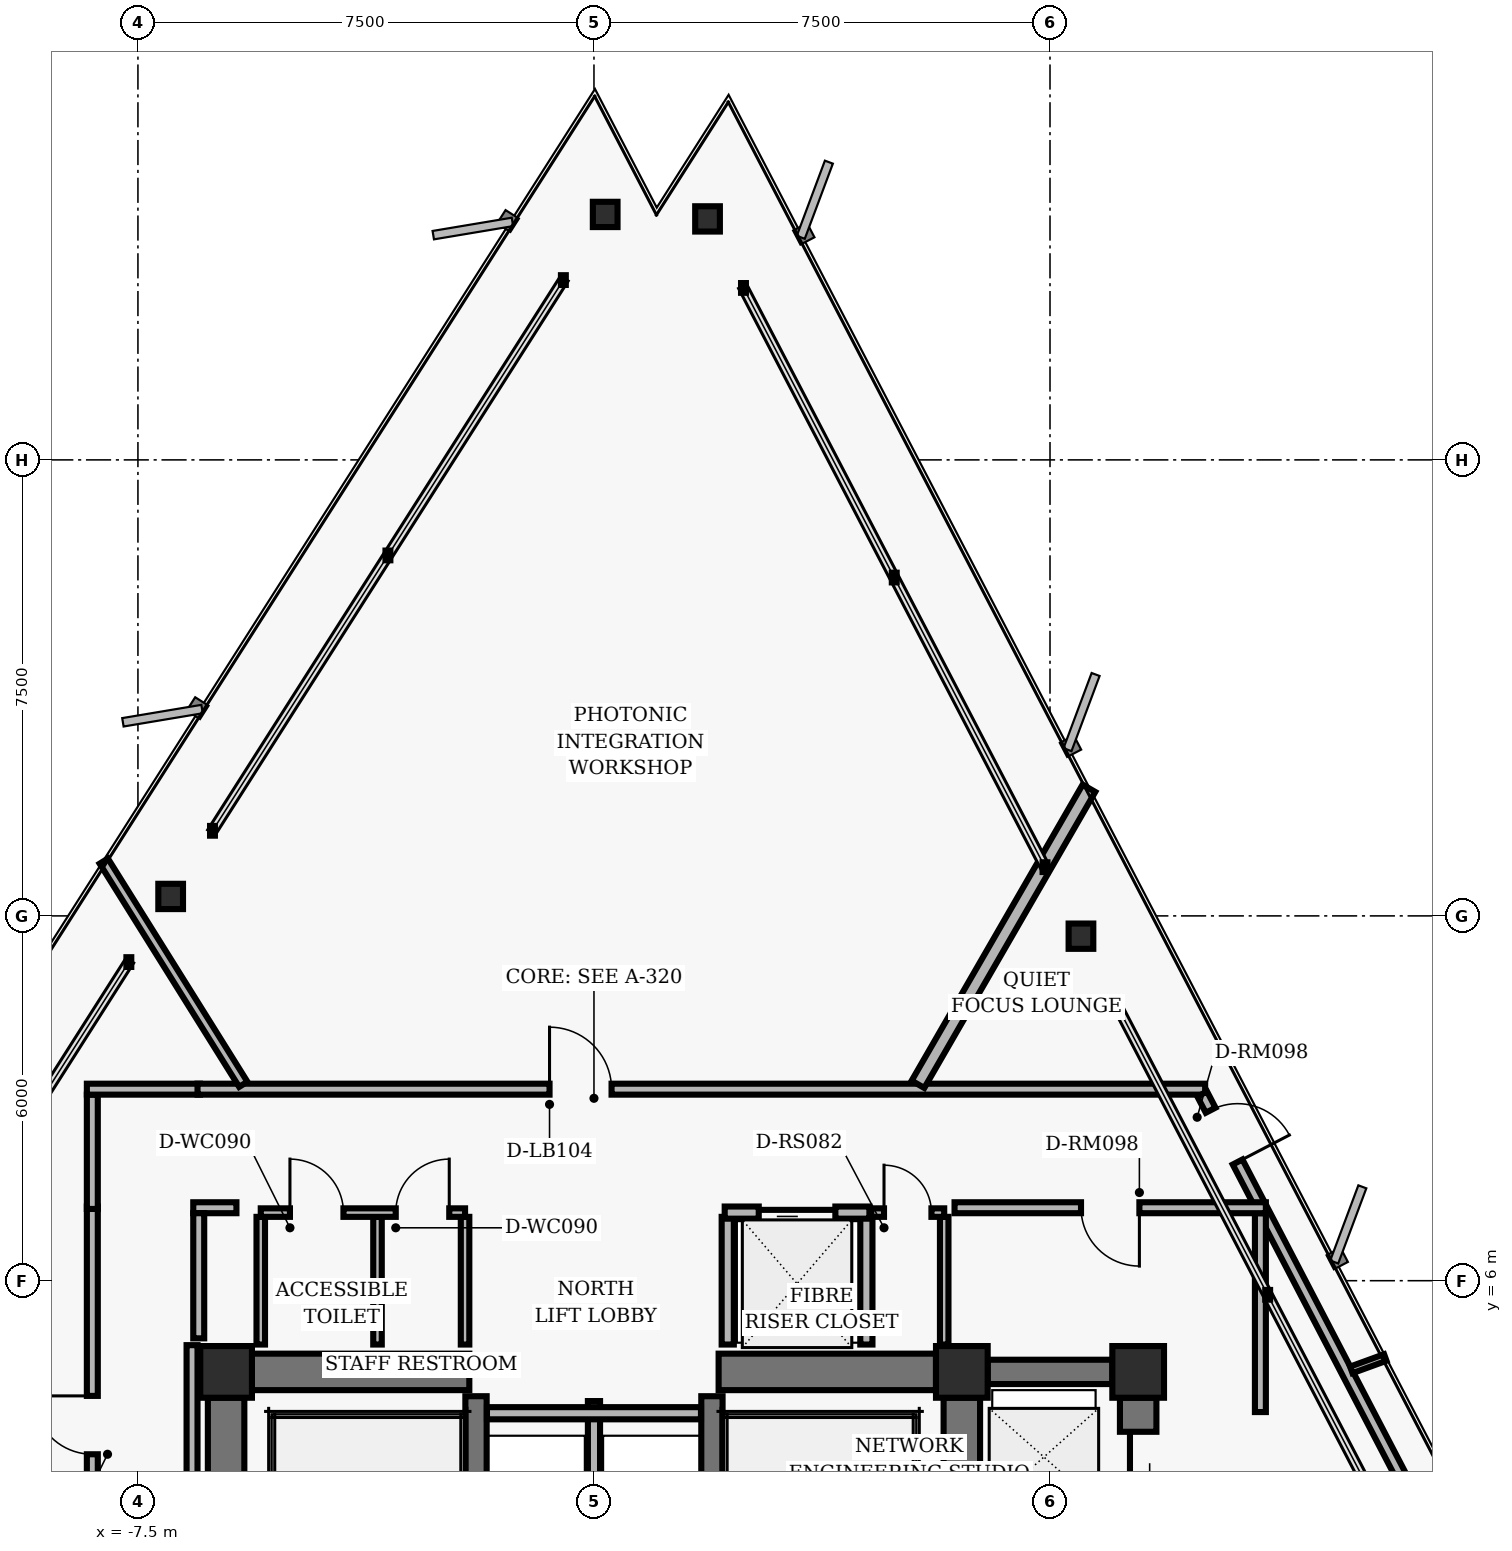
"""IFC4 building model, lengths in metres.
Left out: names, types, materials, properties, quantities, classifications, styles, units other than length and angle.
Written with IfcOpenShell. Run it as: python <this file> out.ifc"""

import sys

from ifc_helpers import new_model, si_unit, direction, frame, frame_2d, origin, origin_2d, place, context, subcontext, project, spatial, rectangle, hollow_rectangle, i_section, extrude, element, fill, save


model = new_model("IFC4")
c1 = context("Model", 3, precision=1e-05, world=origin(), true_north=direction((0.0, 1.0)))
c2 = subcontext(c1, "Body", "Model", "MODEL_VIEW")
j1 = project(units=[si_unit("LENGTHUNIT", "METRE"), si_unit("PLANEANGLEUNIT", "RADIAN")], contexts=[c1])
p1 = place(None, origin())
s1 = spatial("IfcSite", under=j1, at=p1, CompositionType="ELEMENT")
p2 = place(p1, origin())
s2 = spatial("IfcBuilding", under=s1, at=p2, CompositionType="ELEMENT")
p3 = place(p2, frame((0.0, 0.0, 135.04)))
s3 = spatial("IfcBuildingStorey", under=s2, at=p3, CompositionType="ELEMENT", Elevation=135.04)
for number, where, z_axis, x_axis in (
    (1, (-6.05, 4.5, 0.0), (0.0, 0.0, 1.0), (1.0, 0.0, 0.0)),
    (2, (6.05, 4.5, 0.0), (0.0, 0.0, 1.0), (1.0, 0.0, 0.0)),
    (3, (8.95, 4.5, 0.0), (0.0, 0.0, 1.0), (1.0, 0.0, 0.0)),
):
    element("IfcColumn", number, at=place(p3, frame(where, z_axis=z_axis, x_axis=x_axis)), inside=s3, PredefinedType="COLUMN", context=c2, shape_type="SweptSolid", body=[
        extrude(hollow_rectangle(XDim=0.85, YDim=0.85, WallThickness=0.055, InnerFilletRadius=0.02, OuterFilletRadius=0.04, at=origin_2d()), origin(), (0.0, 0.0, 1.0), 3.04),
    ])
for number, where, z_axis, x_axis in (
    (4, (-6.05, 0.425, 0.0), (0.0, 0.0, 1.0), (0.0, 1.0, 0.0)),
    (5, (6.05, 0.425, 0.0), (0.0, 0.0, 1.0), (0.0, 1.0, 0.0)),
):
    element("IfcWall", number, at=place(p3, frame(where, z_axis=z_axis, x_axis=x_axis)), inside=s3, PredefinedType="SHEAR", context=c2, shape_type="SweptSolid", body=[
        extrude(rectangle(XDim=3.65, YDim=0.6, at=frame_2d((1.825, 0.0))), origin(), (0.0, 0.0, 1.0), 2.788),
    ])
for number, where, z_axis, x_axis in (
    (6, (-1.94, -4.1, 0.0), (0.0, 0.0, 1.0), (0.0, 1.0, 0.0)),
    (7, (1.94, -4.1, 0.0), (0.0, 0.0, 1.0), (0.0, 1.0, 0.0)),
):
    element("IfcWall", number, at=place(p3, frame(where, z_axis=z_axis, x_axis=x_axis)), inside=s3, PredefinedType="SHEAR", context=c2, shape_type="SweptSolid", body=[
        extrude(rectangle(XDim=8.2, YDim=0.35, at=frame_2d((4.1, 0.0))), origin(), (0.0, 0.0, 1.0), 2.788),
    ])
for number, where, z_axis, x_axis in (
    (8, (-5.625, 4.5, 0.0), (0.0, 0.0, 1.0), (1.0, 0.0, 0.0)),
    (9, (2.05, 4.5, 0.0), (0.0, 0.0, 1.0), (1.0, 0.0, 0.0)),
):
    element("IfcWall", number, at=place(p3, frame(where, z_axis=z_axis, x_axis=x_axis)), inside=s3, PredefinedType="SHEAR", context=c2, shape_type="SweptSolid", body=[
        extrude(rectangle(XDim=3.575, YDim=0.6, at=frame_2d((1.788, 0.0))), origin(), (0.0, 0.0, 1.0), 2.788),
    ])
p4 = place(p3, frame((8.95, -3.875, 0.0), z_axis=(0.0, 0.0, 1.0), x_axis=(0.0, 1.0, 0.0)))
e10 = element("IfcWall", 10, at=p4, inside=s3, PredefinedType="SHEAR", context=c2, shape_type="SweptSolid", body=[
    extrude(rectangle(XDim=7.95, YDim=0.6, at=frame_2d((3.975, 0.0))), origin(), (0.0, 0.0, 1.0), 2.788),
])
p5 = place(p4, frame((0.55, 0.0, 0.0)))
e11 = element("IfcOpeningElement", 11, at=p5, cuts=e10, PredefinedType="OPENING", context=c2, shape_type="SweptSolid", body=[
    extrude(rectangle(XDim=1.06, YDim=2.04, at=frame_2d((0.53, 1.02))), frame((0.0, 0.31, 0.0), z_axis=(0.0, -1.0, 0.0), x_axis=(1.0, 0.0, 0.0)), (0.0, 0.0, 1.0), 0.62),
])
p6 = place(p4, frame((3.445, 0.0, 0.0)))
e12 = element("IfcOpeningElement", 12, at=p6, cuts=e10, PredefinedType="OPENING", context=c2, shape_type="SweptSolid", body=[
    extrude(rectangle(XDim=1.06, YDim=2.04, at=frame_2d((0.53, 1.02))), frame((0.0, 0.31, 0.0), z_axis=(0.0, -1.0, 0.0), x_axis=(1.0, 0.0, 0.0)), (0.0, 0.0, 1.0), 0.62),
])
p7 = place(p4, frame((6.33, 0.0, 0.0)))
e13 = element("IfcOpeningElement", 13, at=p7, cuts=e10, PredefinedType="OPENING", context=c2, shape_type="SweptSolid", body=[
    extrude(rectangle(XDim=1.06, YDim=2.04, at=frame_2d((0.53, 1.02))), frame((0.0, 0.31, 0.0), z_axis=(0.0, -1.0, 0.0), x_axis=(1.0, 0.0, 0.0)), (0.0, 0.0, 1.0), 0.62),
])
p8 = place(p3, frame((6.475, 4.5, 0.0), z_axis=(0.0, 0.0, 1.0), x_axis=(1.0, 0.0, 0.0)))
e14 = element("IfcWall", 14, at=p8, inside=s3, PredefinedType="SHEAR", context=c2, shape_type="SweptSolid", body=[
    extrude(rectangle(XDim=2.05, YDim=0.4, at=frame_2d((1.025, 0.0))), origin(), (0.0, 0.0, 1.0), 2.788),
])
for number, where, z_axis, x_axis in (
    (15, (8.009, 11.666, 0.0), (0.0, 0.0, 1.0), (1.0, 0.0, 0.0)),
    (16, (1.868, 23.463, 0.0), (0.0, 0.0, 1.0), (1.0, 0.0, 0.0)),
    (17, (0.184, 23.537, 0.0), (0.0, 0.0, 1.0), (1.0, 0.0, 0.0)),
    (18, (-6.962, 12.32, 0.0), (0.0, 0.0, 1.0), (1.0, 0.0, 0.0)),
):
    element("IfcColumn", number, at=place(p3, frame(where, z_axis=z_axis, x_axis=x_axis)), inside=s3, PredefinedType="COLUMN", context=c2, shape_type="SweptSolid", body=[
        extrude(i_section(OverallWidth=0.406, OverallDepth=0.416, WebThickness=0.03, FlangeThickness=0.048, FilletRadius=0.02, at=origin_2d()), origin(), (0.0, 0.0, 1.0), 3.04),
    ])
p9 = place(p3, frame((0.0, 1.25, 0.0), z_axis=(0.0, 0.0, 1.0), x_axis=(0.0, 1.0, 0.0)))
e19 = element("IfcWall", 19, at=p9, inside=s3, PredefinedType="PARTITIONING", context=c2, shape_type="SweptSolid", body=[
    extrude(rectangle(XDim=2.77, YDim=0.2, at=frame_2d((1.385, 0.0))), origin(), (0.0, 0.0, 1.0), 2.763),
])
p10 = place(p3, frame((-1.76, 3.82, 0.0), z_axis=(0.0, 0.0, 1.0), x_axis=(1.0, 0.0, 0.0)))
e20 = element("IfcWall", 20, at=p10, inside=s3, PredefinedType="PARTITIONING", context=c2, shape_type="SweptSolid", body=[
    extrude(rectangle(XDim=3.52, YDim=0.2, at=frame_2d((1.76, 0.0))), origin(), (0.0, 0.0, 1.0), 2.763),
])
for number, where, z_axis, x_axis in (
    (21, (2.2, 4.95, 0.0), (0.0, 0.0, 1.0), (0.0, 1.0, 0.0)),
    (22, (4.48, 4.95, 0.0), (0.0, 0.0, 1.0), (0.0, 1.0, 0.0)),
):
    element("IfcWall", number, at=place(p3, frame(where, z_axis=z_axis, x_axis=x_axis)), inside=s3, PredefinedType="PARTITIONING", context=c2, shape_type="SweptSolid", body=[
        extrude(rectangle(XDim=2.1, YDim=0.2, at=frame_2d((1.05, 0.0))), origin(), (0.0, 0.0, 1.0), 2.763),
    ])
p11 = place(p3, frame((2.15, 7.12, 0.0), z_axis=(0.0, 0.0, 1.0), x_axis=(1.0, 0.0, 0.0)))
e23 = element("IfcWall", 23, at=p11, inside=s3, PredefinedType="PARTITIONING", context=c2, shape_type="SweptSolid", body=[
    extrude(rectangle(XDim=2.38, YDim=0.2, at=frame_2d((1.19, 0.0))), origin(), (0.0, 0.0, 1.0), 2.763),
])
p12 = place(p11, frame((0.56, 0.0, 0.0)))
e24 = element("IfcOpeningElement", 24, at=p12, cuts=e23, PredefinedType="OPENING", context=c2, shape_type="SweptSolid", body=[
    extrude(rectangle(XDim=1.26, YDim=2.06, at=frame_2d((0.63, 1.03))), frame((0.0, 0.11, 0.0), z_axis=(0.0, -1.0, 0.0), x_axis=(1.0, 0.0, 0.0)), (0.0, 0.0, 1.0), 0.22),
])
for number, where, z_axis, x_axis in (
    (25, (-5.48, 4.95, 0.0), (0.0, 0.0, 1.0), (0.0, 1.0, 0.0)),
    (26, (-3.56, 4.95, 0.0), (0.0, 0.0, 1.0), (0.0, 1.0, 0.0)),
    (27, (-2.12, 4.95, 0.0), (0.0, 0.0, 1.0), (0.0, 1.0, 0.0)),
):
    element("IfcWall", number, at=place(p3, frame(where, z_axis=z_axis, x_axis=x_axis)), inside=s3, PredefinedType="PARTITIONING", context=c2, shape_type="SweptSolid", body=[
        extrude(rectangle(XDim=2.1, YDim=0.14, at=frame_2d((1.05, 0.0))), origin(), (0.0, 0.0, 1.0), 2.763),
    ])
p13 = place(p3, frame((-5.48, 7.12, 0.0), z_axis=(0.0, 0.0, 1.0), x_axis=(1.0, 0.0, 0.0)))
e28 = element("IfcWall", 28, at=p13, inside=s3, PredefinedType="PARTITIONING", context=c2, shape_type="SweptSolid", body=[
    extrude(rectangle(XDim=3.36, YDim=0.14, at=frame_2d((1.68, 0.0))), origin(), (0.0, 0.0, 1.0), 2.33),
])
p14 = place(p13, frame((0.48, 0.0, 0.0)))
e29 = element("IfcOpeningElement", 29, at=p14, cuts=e28, PredefinedType="OPENING", context=c2, shape_type="SweptSolid", body=[
    extrude(rectangle(XDim=0.88, YDim=2.02, at=frame_2d((0.44, 1.01))), frame((0.0, 0.08, 0.0), z_axis=(0.0, -1.0, 0.0), x_axis=(1.0, 0.0, 0.0)), (0.0, 0.0, 1.0), 0.16),
])
p15 = place(p13, frame((2.22, 0.0, 0.0)))
e30 = element("IfcOpeningElement", 30, at=p15, cuts=e28, PredefinedType="OPENING", context=c2, shape_type="SweptSolid", body=[
    extrude(rectangle(XDim=0.88, YDim=2.02, at=frame_2d((0.44, 1.01))), frame((0.0, 0.08, 0.0), z_axis=(0.0, -1.0, 0.0), x_axis=(1.0, 0.0, 0.0)), (0.0, 0.0, 1.0), 0.16),
])
p16 = place(p3, frame((5.76, 4.95, 0.0), z_axis=(0.0, 0.0, 1.0), x_axis=(0.0, 1.0, 0.0)))
e31 = element("IfcWall", 31, at=p16, inside=s3, PredefinedType="PARTITIONING", context=c2, shape_type="SweptSolid", body=[
    extrude(rectangle(XDim=2.1, YDim=0.14, at=frame_2d((1.05, 0.0))), origin(), (0.0, 0.0, 1.0), 2.763),
])
p17 = place(p3, frame((4.56, 7.12, 0.0), z_axis=(0.0, 0.0, 1.0), x_axis=(1.0, 0.0, 0.0)))
e32 = element("IfcWall", 32, at=p17, inside=s3, PredefinedType="PARTITIONING", context=c2, shape_type="SweptSolid", body=[
    extrude(rectangle(XDim=1.2, YDim=0.14, at=frame_2d((0.6, 0.0))), origin(), (0.0, 0.0, 1.0), 2.763),
])
p18 = place(p17, frame((0.21, 0.0, 0.0)))
e33 = element("IfcOpeningElement", 33, at=p18, cuts=e32, PredefinedType="OPENING", context=c2, shape_type="SweptSolid", body=[
    extrude(rectangle(XDim=0.78, YDim=2.01, at=frame_2d((0.39, 1.005))), frame((0.0, 0.08, 0.0), z_axis=(0.0, -1.0, 0.0), x_axis=(1.0, 0.0, 0.0)), (0.0, 0.0, 1.0), 0.16),
])
p19 = place(p3, frame((-8.25, -7.22, 0.0), z_axis=(0.0, 0.0, 1.0), x_axis=(0.0, 1.0, 0.0)))
e34 = element("IfcWall", 34, at=p19, inside=s3, PredefinedType="PARTITIONING", context=c2, shape_type="SweptSolid", body=[
    extrude(rectangle(XDim=14.44, YDim=0.18, at=frame_2d((7.22, 0.0))), origin(), (0.0, 0.0, 1.0), 2.763),
])
p20 = place(p19, frame((3.406, 0.0, 0.0)))
e35 = element("IfcOpeningElement", 35, at=p20, cuts=e34, PredefinedType="OPENING", context=c2, shape_type="SweptSolid", body=[
    extrude(rectangle(XDim=0.96, YDim=2.02, at=frame_2d((0.48, 1.01))), frame((0.0, 0.1, 0.0), z_axis=(0.0, -1.0, 0.0), x_axis=(1.0, 0.0, 0.0)), (0.0, 0.0, 1.0), 0.2),
])
p21 = place(p19, frame((10.365, 0.0, 0.0)))
e36 = element("IfcOpeningElement", 36, at=p21, cuts=e34, PredefinedType="OPENING", context=c2, shape_type="SweptSolid", body=[
    extrude(rectangle(XDim=0.96, YDim=2.02, at=frame_2d((0.48, 1.01))), frame((0.0, 0.1, 0.0), z_axis=(0.0, -1.0, 0.0), x_axis=(1.0, 0.0, 0.0)), (0.0, 0.0, 1.0), 0.2),
])
p22 = place(p3, frame((-8.25, 7.18, 0.0), z_axis=(0.0, 0.0, 1.0), x_axis=(0.0, 1.0, 0.0)))
e37 = element("IfcWall", 37, at=p22, inside=s3, PredefinedType="PARTITIONING", context=c2, shape_type="SweptSolid", body=[
    extrude(rectangle(XDim=1.88, YDim=0.18, at=frame_2d((0.94, 0.0))), origin(), (0.0, 0.0, 1.0), 2.763),
])
p23 = place(p3, frame((-8.34, 9.15, 0.0), z_axis=(0.0, 0.0, 1.0), x_axis=(1.0, 0.0, 0.0)))
e38 = element("IfcWall", 38, at=p23, inside=s3, PredefinedType="PARTITIONING", context=c2, shape_type="SweptSolid", body=[
    extrude(rectangle(XDim=1.86, YDim=0.18, at=frame_2d((0.93, 0.0))), origin(), (0.0, 0.0, 1.0), 2.763),
])
p24 = place(p3, frame((-6.52, 9.15, 0.0), z_axis=(0.0, 0.0, 1.0), x_axis=(1.0, 0.0, 0.0)))
e39 = element("IfcWall", 39, at=p24, inside=s3, PredefinedType="PARTITIONING", context=c2, shape_type="SweptSolid", body=[
    extrude(rectangle(XDim=16.572, YDim=0.18, at=frame_2d((8.286, 0.0))), origin(), (0.0, 0.0, 1.0), 2.33),
])
p25 = place(p24, frame((5.789, 0.0, 0.0)))
e40 = element("IfcOpeningElement", 40, at=p25, cuts=e39, PredefinedType="OPENING", context=c2, shape_type="SweptSolid", body=[
    extrude(rectangle(XDim=1.02, YDim=2.02, at=frame_2d((0.51, 1.01))), frame((0.0, 0.1, 0.0), z_axis=(0.0, -1.0, 0.0), x_axis=(1.0, 0.0, 0.0)), (0.0, 0.0, 1.0), 0.2),
])
p26 = place(p3, frame((10.003, 9.07, 0.0), z_axis=(0.0, 0.0, 1.0), x_axis=(0.461740291408, -0.887015165198, 0.0)))
e41 = element("IfcWall", 41, at=p26, inside=s3, PredefinedType="PARTITIONING", context=c2, shape_type="SweptSolid", body=[
    extrude(rectangle(XDim=9.976, YDim=0.18, at=frame_2d((4.988, 0.0))), origin(), (0.0, 0.0, 1.0), 2.763),
])
p27 = place(p26, frame((0.301, 0.0, 0.0)))
e42 = element("IfcOpeningElement", 42, at=p27, cuts=e41, PredefinedType="OPENING", context=c2, shape_type="SweptSolid", body=[
    extrude(rectangle(XDim=0.96, YDim=2.02, at=frame_2d((0.48, 1.01))), frame((0.0, 0.1, 0.0), z_axis=(0.0, -1.0, 0.0), x_axis=(1.0, 0.0, 0.0)), (0.0, 0.0, 1.0), 0.2),
])
p28 = place(p3, frame((10.96, 3.84, 0.0), z_axis=(0.0, 0.0, 1.0), x_axis=(0.0, 1.0, 0.0)))
e43 = element("IfcWall", 43, at=p28, inside=s3, PredefinedType="PARTITIONING", context=c2, shape_type="SweptSolid", body=[
    extrude(rectangle(XDim=3.271, YDim=0.18, at=frame_2d((1.635, 0.0))), origin(), (0.0, 0.0, 1.0), 2.763),
])
p29 = place(p3, frame((11.05, 7.2, 0.0), z_axis=(0.0, 0.0, 1.0), x_axis=(-1.0, 0.0, 0.0)))
e44 = element("IfcWall", 44, at=p29, inside=s3, PredefinedType="PARTITIONING", context=c2, shape_type="SweptSolid", body=[
    extrude(rectangle(XDim=5.12, YDim=0.18, at=frame_2d((2.56, 0.0))), origin(), (0.0, 0.0, 1.0), 2.763),
])
p30 = place(p29, frame((2.08, 0.0, 0.0)))
e45 = element("IfcOpeningElement", 45, at=p30, cuts=e44, PredefinedType="OPENING", context=c2, shape_type="SweptSolid", body=[
    extrude(rectangle(XDim=0.96, YDim=2.02, at=frame_2d((0.48, 1.01))), frame((0.0, 0.1, 0.0), z_axis=(0.0, -1.0, 0.0), x_axis=(1.0, 0.0, 0.0)), (0.0, 0.0, 1.0), 0.2),
])
p31 = place(p3, frame((-5.88, 7.2, 0.0), z_axis=(0.0, 0.0, 1.0), x_axis=(-1.0, 0.0, 0.0)))
e46 = element("IfcWall", 46, at=p31, inside=s3, PredefinedType="PARTITIONING", context=c2, shape_type="SweptSolid", body=[
    extrude(rectangle(XDim=0.71, YDim=0.18, at=frame_2d((0.355, 0.0))), origin(), (0.0, 0.0, 1.0), 2.33),
])
p32 = place(p3, frame((-6.5, 7.11, 0.0), z_axis=(0.0, 0.0, 1.0), x_axis=(0.0, -1.0, 0.0)))
e47 = element("IfcWall", 47, at=p32, inside=s3, PredefinedType="PARTITIONING", context=c2, shape_type="SweptSolid", body=[
    extrude(rectangle(XDim=2.058, YDim=0.18, at=frame_2d((1.029, 0.0))), origin(), (0.0, 0.0, 1.0), 2.132),
])
p33 = place(p3, frame((-6.61, 4.94, 0.0), z_axis=(0.0, 0.0, 1.0), x_axis=(0.0, -1.0, 0.0)))
e48 = element("IfcWall", 48, at=p33, inside=s3, PredefinedType="PARTITIONING", context=c2, shape_type="SweptSolid", body=[
    extrude(rectangle(XDim=9.46, YDim=0.18, at=frame_2d((4.73, 0.0))), origin(), (0.0, 0.0, 1.0), 2.763),
])
p34 = place(p3, frame((12.455, 4.533, 0.0), z_axis=(0.0, 0.0, 1.0), x_axis=(0.93962558955, 0.342204254011, 0.0)))
e49 = element("IfcWall", 49, at=p34, inside=s3, PredefinedType="MOVABLE", context=c2, shape_type="SweptSolid", body=[
    extrude(rectangle(XDim=0.595, YDim=0.115, at=frame_2d((0.297, 0.0))), origin(), (0.0, 0.0, 1.0), 2.763),
])
p35 = place(p3, frame((5.329, 9.23, 0.0), z_axis=(0.0, 0.0, 1.0), x_axis=(0.500024387096, 0.86601132343, 0.0)))
e50 = element("IfcWall", 50, at=p35, inside=s3, PredefinedType="PARTITIONING", context=c2, shape_type="SweptSolid", body=[
    extrude(rectangle(XDim=5.623, YDim=0.24, at=frame_2d((2.812, 0.0))), origin(), (0.0, 0.0, 1.0), 2.763),
])
p36 = place(p3, frame((-5.768, 9.23, 0.0), z_axis=(0.0, 0.0, 1.0), x_axis=(-0.529887412725, 0.848067998356, 0.0)))
e51 = element("IfcWall", 51, at=p36, inside=s3, PredefinedType="PARTITIONING", context=c2, shape_type="SweptSolid", body=[
    extrude(rectangle(XDim=4.329, YDim=0.16, at=frame_2d((2.165, 0.0))), origin(), (0.0, 0.0, 1.0), 2.763),
])
p37 = place(p12, origin())
e52 = element("IfcDoor", 52, at=p37, inside=s3, OperationType="SLIDING_TO_LEFT", PredefinedType="DOOR", context=c2, shape_type="SweptSolid", body=[
    extrude(rectangle(XDim=1.26, YDim=2.06, at=frame_2d((0.63, 1.03))), frame((0.0, 0.025, 0.0), z_axis=(0.0, -1.0, 0.0), x_axis=(1.0, 0.0, 0.0)), (0.0, 0.0, 1.0), 0.05),
])
fill(e24, e52)
p38 = place(p14, origin())
e53 = element("IfcDoor", 53, at=p38, inside=s3, OperationType="SINGLE_SWING_LEFT", PredefinedType="DOOR", context=c2, shape_type="SweptSolid", body=[
    extrude(rectangle(XDim=0.88, YDim=2.02, at=frame_2d((0.44, 1.01))), frame((0.0, 0.025, 0.0), z_axis=(0.0, -1.0, 0.0), x_axis=(1.0, 0.0, 0.0)), (0.0, 0.0, 1.0), 0.05),
])
fill(e29, e53)
p39 = place(p15, origin())
e54 = element("IfcDoor", 54, at=p39, inside=s3, OperationType="SINGLE_SWING_RIGHT", PredefinedType="DOOR", context=c2, shape_type="SweptSolid", body=[
    extrude(rectangle(XDim=0.88, YDim=2.02, at=frame_2d((0.44, 1.01))), frame((0.0, 0.025, 0.0), z_axis=(0.0, -1.0, 0.0), x_axis=(1.0, 0.0, 0.0)), (0.0, 0.0, 1.0), 0.05),
])
fill(e30, e54)
p40 = place(p18, origin())
e55 = element("IfcDoor", 55, at=p40, inside=s3, OperationType="SINGLE_SWING_LEFT", PredefinedType="DOOR", context=c2, shape_type="SweptSolid", body=[
    extrude(rectangle(XDim=0.78, YDim=2.01, at=frame_2d((0.39, 1.005))), frame((0.0, 0.025, 0.0), z_axis=(0.0, -1.0, 0.0), x_axis=(1.0, 0.0, 0.0)), (0.0, 0.0, 1.0), 0.05),
])
fill(e33, e55)
p41 = place(p7, origin())
e56 = element("IfcDoor", 56, at=p41, inside=s3, OperationType="SLIDING_TO_LEFT", PredefinedType="DOOR", context=c2, shape_type="SweptSolid", body=[
    extrude(rectangle(XDim=1.06, YDim=2.04, at=frame_2d((0.53, 1.02))), frame((0.0, 0.025, 0.0), z_axis=(0.0, -1.0, 0.0), x_axis=(1.0, 0.0, 0.0)), (0.0, 0.0, 1.0), 0.05),
])
fill(e13, e56)
p42 = place(p30, origin())
e57 = element("IfcDoor", 57, at=p42, inside=s3, OperationType="SINGLE_SWING_LEFT", PredefinedType="DOOR", context=c2, shape_type="SweptSolid", body=[
    extrude(rectangle(XDim=0.96, YDim=2.02, at=frame_2d((0.48, 1.01))), frame((0.0, 0.025, 0.0), z_axis=(0.0, -1.0, 0.0), x_axis=(1.0, 0.0, 0.0)), (0.0, 0.0, 1.0), 0.05),
])
fill(e45, e57)
p43 = place(p27, origin())
e58 = element("IfcDoor", 58, at=p43, inside=s3, OperationType="SINGLE_SWING_RIGHT", PredefinedType="DOOR", context=c2, shape_type="SweptSolid", body=[
    extrude(rectangle(XDim=0.96, YDim=2.02, at=frame_2d((0.48, 1.01))), frame((0.0, 0.025, 0.0), z_axis=(0.0, -1.0, 0.0), x_axis=(1.0, 0.0, 0.0)), (0.0, 0.0, 1.0), 0.05),
])
fill(e42, e58)
p44 = place(p25, origin())
e59 = element("IfcDoor", 59, at=p44, inside=s3, OperationType="SINGLE_SWING_LEFT", PredefinedType="DOOR", context=c2, shape_type="SweptSolid", body=[
    extrude(rectangle(XDim=1.02, YDim=2.02, at=frame_2d((0.51, 1.01))), frame((0.0, 0.025, 0.0), z_axis=(0.0, -1.0, 0.0), x_axis=(1.0, 0.0, 0.0)), (0.0, 0.0, 1.0), 0.05),
])
fill(e40, e59)
p45 = place(p21, origin())
e60 = element("IfcDoor", 60, at=p45, inside=s3, OperationType="SINGLE_SWING_RIGHT", PredefinedType="DOOR", context=c2, shape_type="SweptSolid", body=[
    extrude(rectangle(XDim=0.96, YDim=2.02, at=frame_2d((0.48, 1.01))), frame((0.0, 0.025, 0.0), z_axis=(0.0, -1.0, 0.0), x_axis=(1.0, 0.0, 0.0)), (0.0, 0.0, 1.0), 0.05),
])
fill(e36, e60)
save(model, sys.argv[1])
